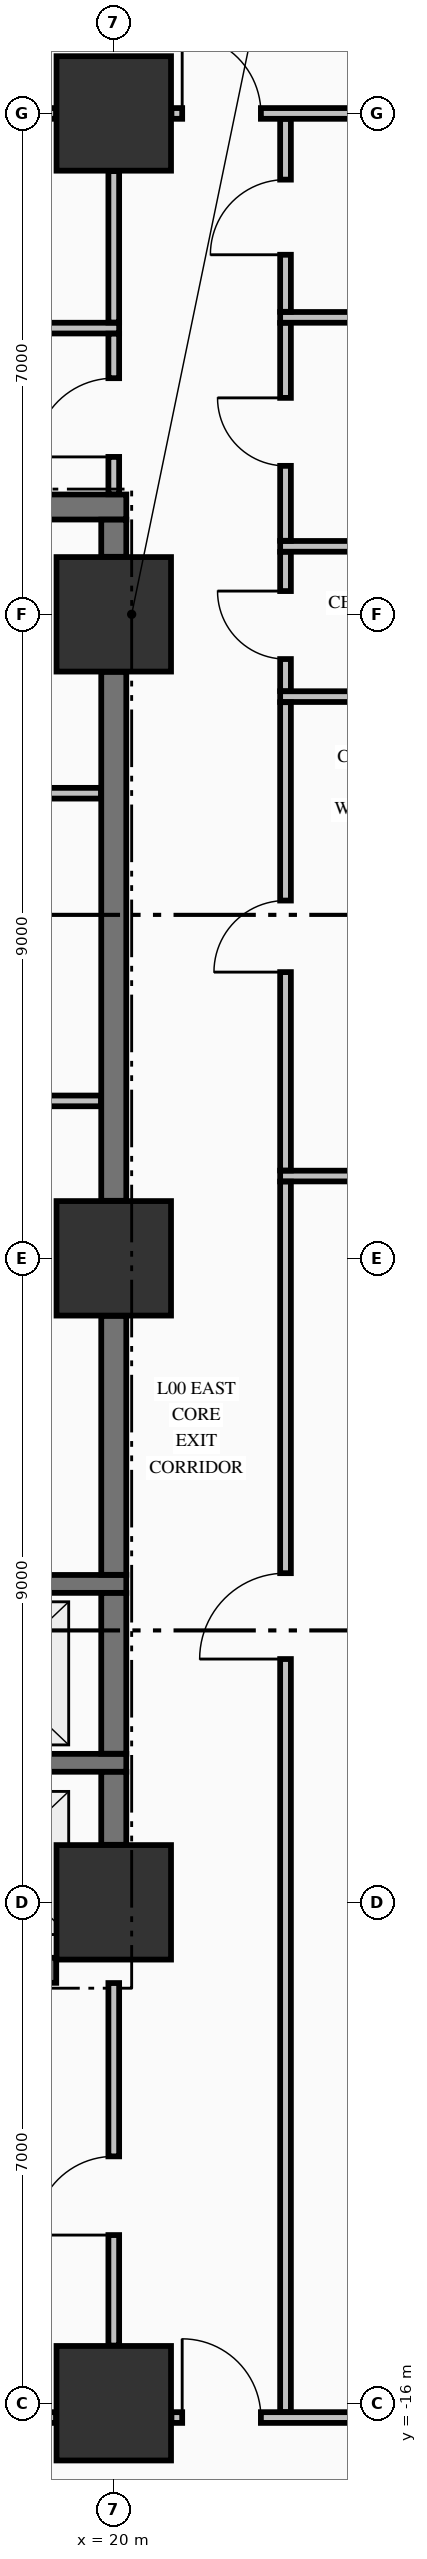
"""IFC4 building model, lengths in metres.
Left out: names, types, materials, properties, quantities, classifications, styles, units other than length and angle.
Written with IfcOpenShell. Run it as: python <this file> out.ifc"""

import sys

from ifc_helpers import new_model, si_unit, direction, frame, frame_2d, origin, origin_2d, place, context, subcontext, project, spatial, rectangle, extrude, element, fill, save


model = new_model("IFC4")
c1 = context("Model", 3, precision=1e-05, world=origin(), true_north=direction((0.0, 1.0)))
c2 = subcontext(c1, "Body", "Model", "MODEL_VIEW")
j1 = project(units=[si_unit("LENGTHUNIT", "METRE"), si_unit("PLANEANGLEUNIT", "RADIAN")], contexts=[c1])
p1 = place(None, origin())
s1 = spatial("IfcSite", under=j1, at=p1, CompositionType="ELEMENT")
p2 = place(p1, origin())
s2 = spatial("IfcBuilding", under=s1, at=p2, CompositionType="ELEMENT")
p3 = place(p2, origin())
s3 = spatial("IfcBuildingStorey", under=s2, at=p3, CompositionType="ELEMENT", Elevation=0.0)
for number, where, z_axis, x_axis in (
    (1, (20.0, -16.0, 0.0), (0.0, 0.0, 1.0), (1.0, 0.0, 0.0)),
    (2, (20.0, -9.0, 0.0), (0.0, 0.0, 1.0), (1.0, 0.0, 0.0)),
    (3, (20.0, 0.0, 0.0), (0.0, 0.0, 1.0), (1.0, 0.0, 0.0)),
    (4, (20.0, 9.0, 0.0), (0.0, 0.0, 1.0), (1.0, 0.0, 0.0)),
    (5, (20.0, 16.0, 0.0), (0.0, 0.0, 1.0), (1.0, 0.0, 0.0)),
):
    element("IfcColumn", number, at=place(p3, frame(where, z_axis=z_axis, x_axis=x_axis)), inside=s3, PredefinedType="COLUMN", context=c2, shape_type="SweptSolid", body=[
        extrude(rectangle(XDim=1.6, YDim=1.6, at=origin_2d()), origin(), (0.0, 0.0, 1.0), 5.09),
    ])
p4 = place(p3, frame((14.7, -9.95, 0.0), z_axis=(0.0, 0.0, 1.0), x_axis=(1.0, 0.0, 0.0)))
e6 = element("IfcWall", 6, at=p4, inside=s3, PredefinedType="SHEAR", context=c2, shape_type="SweptSolid", body=[
    extrude(rectangle(XDim=4.496, YDim=0.35, at=frame_2d((2.248, 0.0))), origin(), (0.0, 0.0, 1.0), 5.09),
])
p5 = place(p4, frame((0.65, 0.0, 0.0)))
e7 = element("IfcOpeningElement", 7, at=p5, cuts=e6, PredefinedType="OPENING", context=c2, shape_type="SweptSolid", body=[
    extrude(rectangle(XDim=1.2, YDim=2.15, at=frame_2d((0.6, 1.075))), frame((0.0, 0.185, 0.0), z_axis=(0.0, -1.0, 0.0), x_axis=(1.0, 0.0, 0.0)), (0.0, 0.0, 1.0), 0.37),
])
for number, where, z_axis, x_axis in (
    (8, (17.025, -7.05, 0.0), (0.0, 0.0, 1.0), (1.0, 0.0, 0.0)),
    (9, (17.025, -4.55, 0.0), (0.0, 0.0, 1.0), (1.0, 0.0, 0.0)),
):
    element("IfcWall", number, at=place(p3, frame(where, z_axis=z_axis, x_axis=x_axis)), inside=s3, PredefinedType="SOLIDWALL", context=c2, shape_type="SweptSolid", body=[
        extrude(rectangle(XDim=3.15, YDim=0.25, at=frame_2d((1.575, 0.0))), origin(), (0.0, 0.0, 1.0), 5.09),
    ])
p6 = place(p3, frame((14.7, 10.5, 0.0), z_axis=(0.0, 0.0, 1.0), x_axis=(1.0, 0.0, 0.0)))
e10 = element("IfcWall", 10, at=p6, inside=s3, PredefinedType="SHEAR", context=c2, shape_type="SweptSolid", body=[
    extrude(rectangle(XDim=5.475, YDim=0.35, at=frame_2d((2.738, 0.0))), origin(), (0.0, 0.0, 1.0), 5.09),
])
p7 = place(p6, frame((0.6, 0.0, 0.0)))
e11 = element("IfcOpeningElement", 11, at=p7, cuts=e10, PredefinedType="OPENING", context=c2, shape_type="SweptSolid", body=[
    extrude(rectangle(XDim=0.9, YDim=2.15, at=frame_2d((0.45, 1.075))), frame((0.0, 0.185, 0.0), z_axis=(0.0, -1.0, 0.0), x_axis=(1.0, 0.0, 0.0)), (0.0, 0.0, 1.0), 0.37),
])
p8 = place(p3, frame((11.806, -16.2, 0.0), z_axis=(0.0, 0.0, 1.0), x_axis=(1.0, 0.0, 0.0)))
e12 = element("IfcWall", 12, at=p8, inside=s3, PredefinedType="PARTITIONING", context=c2, shape_type="SweptSolid", body=[
    extrude(rectangle(XDim=7.388, YDim=0.15, at=frame_2d((3.694, 0.0))), origin(), (0.0, 0.0, 1.0), 4.132),
])
p9 = place(p8, frame((3.094, 0.0, 0.0)))
e13 = element("IfcOpeningElement", 13, at=p9, cuts=e12, PredefinedType="OPENING", context=c2, shape_type="SweptSolid", body=[
    extrude(rectangle(XDim=1.2, YDim=2.15, at=frame_2d((0.6, 1.075))), frame((0.0, 0.085, 0.0), z_axis=(0.0, -1.0, 0.0), x_axis=(1.0, 0.0, 0.0)), (0.0, 0.0, 1.0), 0.17),
])
p10 = place(p3, frame((20.806, -16.2, 0.0), z_axis=(0.0, 0.0, 1.0), x_axis=(1.0, 0.0, 0.0)))
e14 = element("IfcWall", 14, at=p10, inside=s3, PredefinedType="PARTITIONING", context=c2, shape_type="SweptSolid", body=[
    extrude(rectangle(XDim=4.488, YDim=0.15, at=frame_2d((2.244, 0.0))), origin(), (0.0, 0.0, 1.0), 4.132),
])
p11 = place(p10, frame((0.15, 0.0, 0.0)))
e15 = element("IfcOpeningElement", 15, at=p11, cuts=e14, PredefinedType="OPENING", context=c2, shape_type="SweptSolid", body=[
    extrude(rectangle(XDim=1.1, YDim=2.15, at=frame_2d((0.55, 1.075))), frame((0.0, 0.085, 0.0), z_axis=(0.0, -1.0, 0.0), x_axis=(1.0, 0.0, 0.0)), (0.0, 0.0, 1.0), 0.17),
])
p12 = place(p10, frame((2.844, 0.0, 0.0)))
e16 = element("IfcOpeningElement", 16, at=p12, cuts=e14, PredefinedType="OPENING", context=c2, shape_type="SweptSolid", body=[
    extrude(rectangle(XDim=1.1, YDim=2.15, at=frame_2d((0.55, 1.075))), frame((0.0, 0.085, 0.0), z_axis=(0.0, -1.0, 0.0), x_axis=(1.0, 0.0, 0.0)), (0.0, 0.0, 1.0), 0.17),
])
p13 = place(p3, frame((22.325, 1.15, 0.0), z_axis=(0.0, 0.0, 1.0), x_axis=(1.0, 0.0, 0.0)))
e17 = element("IfcWall", 17, at=p13, inside=s3, PredefinedType="PARTITIONING", context=c2, shape_type="SweptSolid", body=[
    extrude(rectangle(XDim=3.75, YDim=0.15, at=frame_2d((1.875, 0.0))), origin(), (0.0, 0.0, 1.0), 5.09),
])
p14 = place(p3, frame((14.878, 2.2, 0.0), z_axis=(0.0, 0.0, 1.0), x_axis=(1.0, 0.0, 0.0)))
e18 = element("IfcWall", 18, at=p14, inside=s3, PredefinedType="PARTITIONING", context=c2, shape_type="SweptSolid", body=[
    extrude(rectangle(XDim=4.944, YDim=0.15, at=frame_2d((2.472, 0.0))), origin(), (0.0, 0.0, 1.0), 5.09),
])
p15 = place(p14, frame((0.397, 0.0, 0.0)))
e19 = element("IfcOpeningElement", 19, at=p15, cuts=e18, PredefinedType="OPENING", context=c2, shape_type="SweptSolid", body=[
    extrude(rectangle(XDim=0.95, YDim=2.15, at=frame_2d((0.475, 1.075))), frame((0.0, 0.085, 0.0), z_axis=(0.0, -1.0, 0.0), x_axis=(1.0, 0.0, 0.0)), (0.0, 0.0, 1.0), 0.17),
])
p16 = place(p3, frame((14.878, 6.5, 0.0), z_axis=(0.0, 0.0, 1.0), x_axis=(1.0, 0.0, 0.0)))
e20 = element("IfcWall", 20, at=p16, inside=s3, PredefinedType="PARTITIONING", context=c2, shape_type="SweptSolid", body=[
    extrude(rectangle(XDim=4.944, YDim=0.15, at=frame_2d((2.472, 0.0))), origin(), (0.0, 0.0, 1.0), 5.09),
])
p17 = place(p16, frame((0.397, 0.0, 0.0)))
e21 = element("IfcOpeningElement", 21, at=p17, cuts=e20, PredefinedType="OPENING", context=c2, shape_type="SweptSolid", body=[
    extrude(rectangle(XDim=0.95, YDim=2.15, at=frame_2d((0.475, 1.075))), frame((0.0, 0.085, 0.0), z_axis=(0.0, -1.0, 0.0), x_axis=(1.0, 0.0, 0.0)), (0.0, 0.0, 1.0), 0.17),
])
p18 = place(p16, frame((3.047, 0.0, 0.0)))
e22 = element("IfcOpeningElement", 22, at=p18, cuts=e20, PredefinedType="OPENING", context=c2, shape_type="SweptSolid", body=[
    extrude(rectangle(XDim=0.95, YDim=2.15, at=frame_2d((0.475, 1.075))), frame((0.0, 0.085, 0.0), z_axis=(0.0, -1.0, 0.0), x_axis=(1.0, 0.0, 0.0)), (0.0, 0.0, 1.0), 0.17),
])
for number, where, z_axis, x_axis in (
    (23, (22.325, 7.85, 0.0), (0.0, 0.0, 1.0), (1.0, 0.0, 0.0)),
    (24, (22.325, 9.95, 0.0), (0.0, 0.0, 1.0), (1.0, 0.0, 0.0)),
):
    element("IfcWall", number, at=place(p3, frame(where, z_axis=z_axis, x_axis=x_axis)), inside=s3, PredefinedType="PARTITIONING", context=c2, shape_type="SweptSolid", body=[
        extrude(rectangle(XDim=3.75, YDim=0.15, at=frame_2d((1.875, 0.0))), origin(), (0.0, 0.0, 1.0), 5.09),
    ])
p19 = place(p3, frame((8.765, 13.0, 0.0), z_axis=(0.0, 0.0, 1.0), x_axis=(1.0, 0.0, 0.0)))
e25 = element("IfcWall", 25, at=p19, inside=s3, PredefinedType="PARTITIONING", context=c2, shape_type="SweptSolid", body=[
    extrude(rectangle(XDim=11.31, YDim=0.15, at=frame_2d((5.655, 0.0))), origin(), (0.0, 0.0, 1.0), 5.09),
])
p20 = place(p19, frame((0.485, 0.0, 0.0)))
e26 = element("IfcOpeningElement", 26, at=p20, cuts=e25, PredefinedType="OPENING", context=c2, shape_type="SweptSolid", body=[
    extrude(rectangle(XDim=1.1, YDim=2.15, at=frame_2d((0.55, 1.075))), frame((0.0, 0.085, 0.0), z_axis=(0.0, -1.0, 0.0), x_axis=(1.0, 0.0, 0.0)), (0.0, 0.0, 1.0), 0.17),
])
p21 = place(p3, frame((22.325, 13.15, 0.0), z_axis=(0.0, 0.0, 1.0), x_axis=(1.0, 0.0, 0.0)))
e27 = element("IfcWall", 27, at=p21, inside=s3, PredefinedType="PARTITIONING", context=c2, shape_type="SweptSolid", body=[
    extrude(rectangle(XDim=3.75, YDim=0.15, at=frame_2d((1.875, 0.0))), origin(), (0.0, 0.0, 1.0), 5.09),
])
p22 = place(p3, frame((11.806, 16.0, 0.0), z_axis=(0.0, 0.0, 1.0), x_axis=(1.0, 0.0, 0.0)))
e28 = element("IfcWall", 28, at=p22, inside=s3, PredefinedType="PARTITIONING", context=c2, shape_type="SweptSolid", body=[
    extrude(rectangle(XDim=7.388, YDim=0.15, at=frame_2d((3.694, 0.0))), origin(), (0.0, 0.0, 1.0), 4.132),
])
p23 = place(p3, frame((20.806, 16.0, 0.0), z_axis=(0.0, 0.0, 1.0), x_axis=(1.0, 0.0, 0.0)))
e29 = element("IfcWall", 29, at=p23, inside=s3, PredefinedType="PARTITIONING", context=c2, shape_type="SweptSolid", body=[
    extrude(rectangle(XDim=4.488, YDim=0.15, at=frame_2d((2.244, 0.0))), origin(), (0.0, 0.0, 1.0), 4.132),
])
p24 = place(p23, frame((0.15, 0.0, 0.0)))
e30 = element("IfcOpeningElement", 30, at=p24, cuts=e29, PredefinedType="OPENING", context=c2, shape_type="SweptSolid", body=[
    extrude(rectangle(XDim=1.1, YDim=2.15, at=frame_2d((0.55, 1.075))), frame((0.0, 0.085, 0.0), z_axis=(0.0, -1.0, 0.0), x_axis=(1.0, 0.0, 0.0)), (0.0, 0.0, 1.0), 0.17),
])
p25 = place(p3, frame((20.0, -8.196, 0.0), z_axis=(0.0, 0.0, 1.0), x_axis=(0.0, 1.0, 0.0)))
e31 = element("IfcWall", 31, at=p25, inside=s3, PredefinedType="SHEAR", context=c2, shape_type="SweptSolid", body=[
    extrude(rectangle(XDim=1.019, YDim=0.35, at=frame_2d((0.51, 0.0))), origin(), (0.0, 0.0, 1.0), 5.09),
])
p26 = place(p3, frame((20.0, -6.923, 0.0), z_axis=(0.0, 0.0, 1.0), x_axis=(0.0, 1.0, 0.0)))
e32 = element("IfcWall", 32, at=p26, inside=s3, PredefinedType="SHEAR", context=c2, shape_type="SweptSolid", body=[
    extrude(rectangle(XDim=2.246, YDim=0.35, at=frame_2d((1.123, 0.0))), origin(), (0.0, 0.0, 1.0), 5.09),
])
p27 = place(p3, frame((20.0, -4.423, 0.0), z_axis=(0.0, 0.0, 1.0), x_axis=(0.0, 1.0, 0.0)))
e33 = element("IfcWall", 33, at=p27, inside=s3, PredefinedType="SHEAR", context=c2, shape_type="SweptSolid", body=[
    extrude(rectangle(XDim=3.619, YDim=0.35, at=frame_2d((1.81, 0.0))), origin(), (0.0, 0.0, 1.0), 5.09),
])
p28 = place(p3, frame((20.0, 0.804, 0.0), z_axis=(0.0, 0.0, 1.0), x_axis=(0.0, 1.0, 0.0)))
e34 = element("IfcWall", 34, at=p28, inside=s3, PredefinedType="SHEAR", context=c2, shape_type="SweptSolid", body=[
    extrude(rectangle(XDim=7.392, YDim=0.35, at=frame_2d((3.696, 0.0))), origin(), (0.0, 0.0, 1.0), 5.09),
])
p29 = place(p3, frame((20.0, 9.804, 0.0), z_axis=(0.0, 0.0, 1.0), x_axis=(0.0, 1.0, 0.0)))
e35 = element("IfcWall", 35, at=p29, inside=s3, PredefinedType="SHEAR", context=c2, shape_type="SweptSolid", body=[
    extrude(rectangle(XDim=0.519, YDim=0.35, at=frame_2d((0.26, 0.0))), origin(), (0.0, 0.0, 1.0), 5.09),
])
p30 = place(p3, frame((20.0, -15.194, 0.0), z_axis=(0.0, 0.0, 1.0), x_axis=(0.0, 1.0, 0.0)))
e36 = element("IfcWall", 36, at=p30, inside=s3, PredefinedType="PARTITIONING", context=c2, shape_type="SweptSolid", body=[
    extrude(rectangle(XDim=5.066, YDim=0.15, at=frame_2d((2.533, 0.0))), origin(), (0.0, 0.0, 1.0), 4.132),
])
p31 = place(p30, frame((1.544, 0.0, 0.0)))
e37 = element("IfcOpeningElement", 37, at=p31, cuts=e36, PredefinedType="OPENING", context=c2, shape_type="SweptSolid", body=[
    extrude(rectangle(XDim=1.1, YDim=2.15, at=frame_2d((0.55, 1.075))), frame((0.0, 0.085, 0.0), z_axis=(0.0, -1.0, 0.0), x_axis=(1.0, 0.0, 0.0)), (0.0, 0.0, 1.0), 0.17),
])
p32 = place(p3, frame((20.0, 10.678, 0.0), z_axis=(0.0, 0.0, 1.0), x_axis=(0.0, 1.0, 0.0)))
e38 = element("IfcWall", 38, at=p32, inside=s3, PredefinedType="PARTITIONING", context=c2, shape_type="SweptSolid", body=[
    extrude(rectangle(XDim=2.244, YDim=0.15, at=frame_2d((1.122, 0.0))), origin(), (0.0, 0.0, 1.0), 4.132),
])
p33 = place(p32, frame((0.522, 0.0, 0.0)))
e39 = element("IfcOpeningElement", 39, at=p33, cuts=e38, PredefinedType="OPENING", context=c2, shape_type="SweptSolid", body=[
    extrude(rectangle(XDim=1.1, YDim=2.15, at=frame_2d((0.55, 1.075))), frame((0.0, 0.085, 0.0), z_axis=(0.0, -1.0, 0.0), x_axis=(1.0, 0.0, 0.0)), (0.0, 0.0, 1.0), 0.17),
])
p34 = place(p3, frame((20.0, 13.078, 0.0), z_axis=(0.0, 0.0, 1.0), x_axis=(0.0, 1.0, 0.0)))
e40 = element("IfcWall", 40, at=p34, inside=s3, PredefinedType="PARTITIONING", context=c2, shape_type="SweptSolid", body=[
    extrude(rectangle(XDim=2.116, YDim=0.15, at=frame_2d((1.058, 0.0))), origin(), (0.0, 0.0, 1.0), 4.132),
])
p35 = place(p3, frame((22.4, -16.122, 0.0), z_axis=(0.0, 0.0, 1.0), x_axis=(0.0, 1.0, 0.0)))
e41 = element("IfcWall", 41, at=p35, inside=s3, PredefinedType="PARTITIONING", context=c2, shape_type="SweptSolid", body=[
    extrude(rectangle(XDim=17.194, YDim=0.15, at=frame_2d((8.597, 0.0))), origin(), (0.0, 0.0, 1.0), 5.09),
])
p36 = place(p35, frame((10.522, 0.0, 0.0)))
e42 = element("IfcOpeningElement", 42, at=p36, cuts=e41, PredefinedType="OPENING", context=c2, shape_type="SweptSolid", body=[
    extrude(rectangle(XDim=1.2, YDim=2.15, at=frame_2d((0.6, 1.075))), frame((0.0, 0.085, 0.0), z_axis=(0.0, -1.0, 0.0), x_axis=(1.0, 0.0, 0.0)), (0.0, 0.0, 1.0), 0.17),
])
p37 = place(p3, frame((22.4, 1.228, 0.0), z_axis=(0.0, 0.0, 1.0), x_axis=(0.0, 1.0, 0.0)))
e43 = element("IfcWall", 43, at=p37, inside=s3, PredefinedType="PARTITIONING", context=c2, shape_type="SweptSolid", body=[
    extrude(rectangle(XDim=6.544, YDim=0.15, at=frame_2d((3.272, 0.0))), origin(), (0.0, 0.0, 1.0), 5.09),
])
p38 = place(p37, frame((2.772, 0.0, 0.0)))
e44 = element("IfcOpeningElement", 44, at=p38, cuts=e43, PredefinedType="OPENING", context=c2, shape_type="SweptSolid", body=[
    extrude(rectangle(XDim=1.0, YDim=2.15, at=frame_2d((0.5, 1.075))), frame((0.0, 0.085, 0.0), z_axis=(0.0, -1.0, 0.0), x_axis=(1.0, 0.0, 0.0)), (0.0, 0.0, 1.0), 0.17),
])
p39 = place(p3, frame((22.4, 7.928, 0.0), z_axis=(0.0, 0.0, 1.0), x_axis=(0.0, 1.0, 0.0)))
e45 = element("IfcWall", 45, at=p39, inside=s3, PredefinedType="PARTITIONING", context=c2, shape_type="SweptSolid", body=[
    extrude(rectangle(XDim=1.944, YDim=0.15, at=frame_2d((0.972, 0.0))), origin(), (0.0, 0.0, 1.0), 5.09),
])
p40 = place(p39, frame((0.447, 0.0, 0.0)))
e46 = element("IfcOpeningElement", 46, at=p40, cuts=e45, PredefinedType="OPENING", context=c2, shape_type="SweptSolid", body=[
    extrude(rectangle(XDim=0.95, YDim=2.15, at=frame_2d((0.475, 1.075))), frame((0.0, 0.085, 0.0), z_axis=(0.0, -1.0, 0.0), x_axis=(1.0, 0.0, 0.0)), (0.0, 0.0, 1.0), 0.17),
])
p41 = place(p3, frame((22.4, 10.028, 0.0), z_axis=(0.0, 0.0, 1.0), x_axis=(0.0, 1.0, 0.0)))
e47 = element("IfcWall", 47, at=p41, inside=s3, PredefinedType="PARTITIONING", context=c2, shape_type="SweptSolid", body=[
    extrude(rectangle(XDim=3.044, YDim=0.15, at=frame_2d((1.522, 0.0))), origin(), (0.0, 0.0, 1.0), 5.09),
])
p42 = place(p41, frame((1.047, 0.0, 0.0)))
e48 = element("IfcOpeningElement", 48, at=p42, cuts=e47, PredefinedType="OPENING", context=c2, shape_type="SweptSolid", body=[
    extrude(rectangle(XDim=0.95, YDim=2.15, at=frame_2d((0.475, 1.075))), frame((0.0, 0.085, 0.0), z_axis=(0.0, -1.0, 0.0), x_axis=(1.0, 0.0, 0.0)), (0.0, 0.0, 1.0), 0.17),
])
p43 = place(p3, frame((22.4, 13.228, 0.0), z_axis=(0.0, 0.0, 1.0), x_axis=(0.0, 1.0, 0.0)))
e49 = element("IfcWall", 49, at=p43, inside=s3, PredefinedType="PARTITIONING", context=c2, shape_type="SweptSolid", body=[
    extrude(rectangle(XDim=2.694, YDim=0.15, at=frame_2d((1.347, 0.0))), origin(), (0.0, 0.0, 1.0), 5.09),
])
p44 = place(p43, frame((0.797, 0.0, 0.0)))
e50 = element("IfcOpeningElement", 50, at=p44, cuts=e49, PredefinedType="OPENING", context=c2, shape_type="SweptSolid", body=[
    extrude(rectangle(XDim=1.05, YDim=2.15, at=frame_2d((0.525, 1.075))), frame((0.0, 0.085, 0.0), z_axis=(0.0, -1.0, 0.0), x_axis=(1.0, 0.0, 0.0)), (0.0, 0.0, 1.0), 0.17),
])
p45 = place(p24, origin())
e51 = element("IfcDoor", 51, at=p45, inside=s3, OperationType="SINGLE_SWING_LEFT", PredefinedType="DOOR", context=c2, shape_type="SweptSolid", body=[
    extrude(rectangle(XDim=1.1, YDim=2.15, at=frame_2d((0.55, 1.075))), frame((0.0, 0.025, 0.0), z_axis=(0.0, -1.0, 0.0), x_axis=(1.0, 0.0, 0.0)), (0.0, 0.0, 1.0), 0.05),
])
fill(e30, e51)
p46 = place(p33, origin())
e52 = element("IfcDoor", 52, at=p46, inside=s3, OperationType="SINGLE_SWING_LEFT", PredefinedType="DOOR", context=c2, shape_type="SweptSolid", body=[
    extrude(rectangle(XDim=1.1, YDim=2.15, at=frame_2d((0.55, 1.075))), frame((0.0, 0.025, 0.0), z_axis=(0.0, -1.0, 0.0), x_axis=(1.0, 0.0, 0.0)), (0.0, 0.0, 1.0), 0.05),
])
fill(e39, e52)
p47 = place(p31, origin())
e53 = element("IfcDoor", 53, at=p47, inside=s3, OperationType="SINGLE_SWING_LEFT", PredefinedType="DOOR", context=c2, shape_type="SweptSolid", body=[
    extrude(rectangle(XDim=1.1, YDim=2.15, at=frame_2d((0.55, 1.075))), frame((0.0, 0.025, 0.0), z_axis=(0.0, -1.0, 0.0), x_axis=(1.0, 0.0, 0.0)), (0.0, 0.0, 1.0), 0.05),
])
fill(e37, e53)
p48 = place(p11, origin())
e54 = element("IfcDoor", 54, at=p48, inside=s3, OperationType="SINGLE_SWING_LEFT", PredefinedType="DOOR", context=c2, shape_type="SweptSolid", body=[
    extrude(rectangle(XDim=1.1, YDim=2.15, at=frame_2d((0.55, 1.075))), frame((0.0, 0.025, 0.0), z_axis=(0.0, -1.0, 0.0), x_axis=(1.0, 0.0, 0.0)), (0.0, 0.0, 1.0), 0.05),
])
fill(e15, e54)
p49 = place(p36, origin())
e55 = element("IfcDoor", 55, at=p49, inside=s3, OperationType="SINGLE_SWING_LEFT", PredefinedType="DOOR", context=c2, shape_type="SweptSolid", body=[
    extrude(rectangle(XDim=1.2, YDim=2.15, at=frame_2d((0.6, 1.075))), frame((0.0, 0.025, 0.0), z_axis=(0.0, -1.0, 0.0), x_axis=(1.0, 0.0, 0.0)), (0.0, 0.0, 1.0), 0.05),
])
fill(e42, e55)
p50 = place(p38, origin())
e56 = element("IfcDoor", 56, at=p50, inside=s3, OperationType="SINGLE_SWING_LEFT", PredefinedType="DOOR", context=c2, shape_type="SweptSolid", body=[
    extrude(rectangle(XDim=1.0, YDim=2.15, at=frame_2d((0.5, 1.075))), frame((0.0, 0.025, 0.0), z_axis=(0.0, -1.0, 0.0), x_axis=(1.0, 0.0, 0.0)), (0.0, 0.0, 1.0), 0.05),
])
fill(e44, e56)
p51 = place(p42, origin())
e57 = element("IfcDoor", 57, at=p51, inside=s3, OperationType="SINGLE_SWING_RIGHT", PredefinedType="DOOR", context=c2, shape_type="SweptSolid", body=[
    extrude(rectangle(XDim=0.95, YDim=2.15, at=frame_2d((0.475, 1.075))), frame((0.0, 0.025, 0.0), z_axis=(0.0, -1.0, 0.0), x_axis=(1.0, 0.0, 0.0)), (0.0, 0.0, 1.0), 0.05),
])
fill(e48, e57)
p52 = place(p44, origin())
e58 = element("IfcDoor", 58, at=p52, inside=s3, OperationType="SINGLE_SWING_LEFT", PredefinedType="DOOR", context=c2, shape_type="SweptSolid", body=[
    extrude(rectangle(XDim=1.05, YDim=2.15, at=frame_2d((0.525, 1.075))), frame((0.0, 0.025, 0.0), z_axis=(0.0, -1.0, 0.0), x_axis=(1.0, 0.0, 0.0)), (0.0, 0.0, 1.0), 0.05),
])
fill(e50, e58)
p53 = place(p40, origin())
e59 = element("IfcDoor", 59, at=p53, inside=s3, OperationType="SINGLE_SWING_RIGHT", PredefinedType="DOOR", context=c2, shape_type="SweptSolid", body=[
    extrude(rectangle(XDim=0.95, YDim=2.15, at=frame_2d((0.475, 1.075))), frame((0.0, 0.025, 0.0), z_axis=(0.0, -1.0, 0.0), x_axis=(1.0, 0.0, 0.0)), (0.0, 0.0, 1.0), 0.05),
])
fill(e46, e59)
save(model, sys.argv[1])
